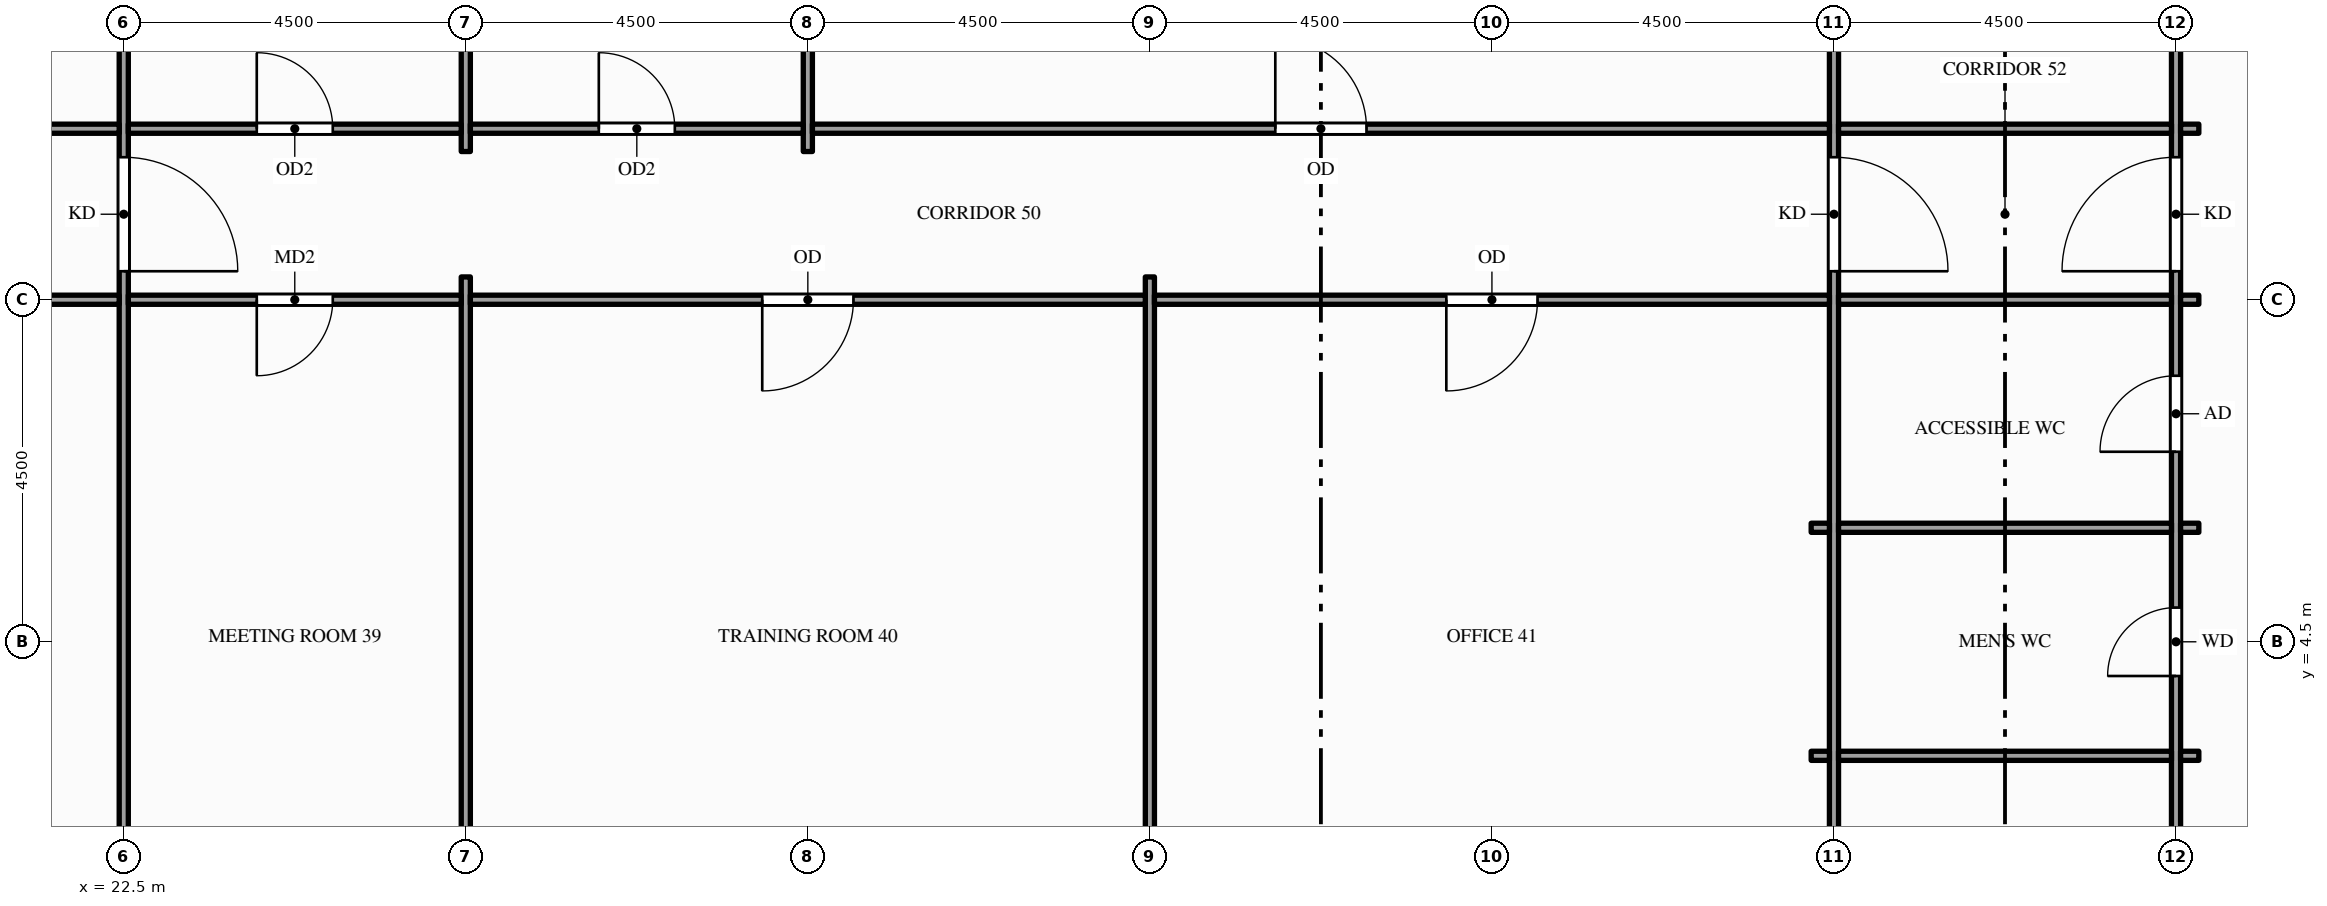
"""IFC4 building model, lengths in metres.
Left out: names, types, materials, properties, quantities, classifications, styles, units other than length and angle.
Written with IfcOpenShell. Run it as: python <this file> out.ifc"""

import sys

from ifc_helpers import new_model, si_unit, direction, frame, frame_2d, origin, place, context, subcontext, project, spatial, rectangle, extrude, element, fill, save


model = new_model("IFC4")
c1 = context("Model", 3, precision=1e-05, world=origin(), true_north=direction((0.0, 1.0)))
c2 = subcontext(c1, "Body", "Model", "MODEL_VIEW")
j1 = project(units=[si_unit("LENGTHUNIT", "METRE"), si_unit("PLANEANGLEUNIT", "RADIAN")], contexts=[c1])
p1 = place(None, origin())
s1 = spatial("IfcSite", under=j1, at=p1, CompositionType="ELEMENT")
p2 = place(p1, origin())
s2 = spatial("IfcBuilding", under=s1, at=p2, CompositionType="ELEMENT")
p3 = place(p2, frame((0.0, 0.0, 14.0)))
s3 = spatial("IfcBuildingStorey", under=s2, at=p3, CompositionType="ELEMENT", Elevation=14.0)
p4 = place(p3, frame((22.5, 0.15, 0.0), z_axis=(0.0, 0.0, 1.0), x_axis=(0.0, 1.0, 0.0)))
e1 = element("IfcWall", 1, at=p4, inside=s3, PredefinedType="PARTITIONING", context=c2, shape_type="SweptSolid", body=[
    extrude(rectangle(XDim=35.95, YDim=0.12, at=frame_2d((17.975, 0.0))), origin(), (0.0, 0.0, 1.0), 3.759),
])
p5 = place(p4, frame((9.225, 0.0, 0.0)))
e2 = element("IfcOpeningElement", 2, at=p5, cuts=e1, PredefinedType="OPENING", context=c2, shape_type="SweptSolid", body=[
    extrude(rectangle(XDim=1.5, YDim=2.1, at=frame_2d((0.75, 1.05))), frame((0.0, 0.07, 0.0), z_axis=(0.0, -1.0, 0.0), x_axis=(1.0, 0.0, 0.0)), (0.0, 0.0, 1.0), 0.14),
])
p6 = place(p4, frame((32.7, 0.0, 0.0)))
e3 = element("IfcOpeningElement", 3, at=p6, cuts=e1, PredefinedType="OPENING", context=c2, shape_type="SweptSolid", body=[
    extrude(rectangle(XDim=1.8, YDim=2.1, at=frame_2d((0.9, 1.05))), frame((0.0, 0.07, 0.0), z_axis=(0.0, -1.0, 0.0), x_axis=(1.0, 0.0, 0.0)), (0.0, 0.0, 1.0), 0.14),
])
p7 = place(p3, frame((27.0, 0.15, 0.0), z_axis=(0.0, 0.0, 1.0), x_axis=(0.0, 1.0, 0.0)))
e4 = element("IfcWall", 4, at=p7, inside=s3, PredefinedType="PARTITIONING", context=c2, shape_type="SweptSolid", body=[
    extrude(rectangle(XDim=9.15, YDim=0.12, at=frame_2d((4.575, 0.0))), origin(), (0.0, 0.0, 1.0), 3.759),
])
for number, where, z_axis, x_axis in (
    (5, (27.0, 10.95, 0.0), (0.0, 0.0, 1.0), (0.0, 1.0, 0.0)),
    (6, (31.5, 10.95, 0.0), (0.0, 0.0, 1.0), (0.0, 1.0, 0.0)),
):
    element("IfcWall", number, at=place(p3, frame(where, z_axis=z_axis, x_axis=x_axis)), inside=s3, PredefinedType="PARTITIONING", context=c2, shape_type="SweptSolid", body=[
        extrude(rectangle(XDim=11.85, YDim=0.12, at=frame_2d((5.925, 0.0))), origin(), (0.0, 0.0, 1.0), 3.759),
    ])
p8 = place(p3, frame((36.0, 0.15, 0.0), z_axis=(0.0, 0.0, 1.0), x_axis=(0.0, 1.0, 0.0)))
e7 = element("IfcWall", 7, at=p8, inside=s3, PredefinedType="PARTITIONING", context=c2, shape_type="SweptSolid", body=[
    extrude(rectangle(XDim=9.15, YDim=0.12, at=frame_2d((4.575, 0.0))), origin(), (0.0, 0.0, 1.0), 3.759),
])
p9 = place(p3, frame((45.0, 0.15, 0.0), z_axis=(0.0, 0.0, 1.0), x_axis=(0.0, 1.0, 0.0)))
e8 = element("IfcWall", 8, at=p9, inside=s3, PredefinedType="PARTITIONING", context=c2, shape_type="SweptSolid", body=[
    extrude(rectangle(XDim=22.65, YDim=0.12, at=frame_2d((11.325, 0.0))), origin(), (0.0, 0.0, 1.0), 3.759),
])
p10 = place(p9, frame((9.225, 0.0, 0.0)))
e9 = element("IfcOpeningElement", 9, at=p10, cuts=e8, PredefinedType="OPENING", context=c2, shape_type="SweptSolid", body=[
    extrude(rectangle(XDim=1.5, YDim=2.1, at=frame_2d((0.75, 1.05))), frame((0.0, 0.07, 0.0), z_axis=(0.0, -1.0, 0.0), x_axis=(1.0, 0.0, 0.0)), (0.0, 0.0, 1.0), 0.14),
])
p11 = place(p3, frame((49.5, 0.15, 0.0), z_axis=(0.0, 0.0, 1.0), x_axis=(0.0, 1.0, 0.0)))
e10 = element("IfcWall", 10, at=p11, inside=s3, PredefinedType="PARTITIONING", context=c2, shape_type="SweptSolid", body=[
    extrude(rectangle(XDim=22.65, YDim=0.12, at=frame_2d((11.325, 0.0))), origin(), (0.0, 0.0, 1.0), 3.759),
])
p12 = place(p11, frame((0.955, 0.0, 0.0)))
e11 = element("IfcOpeningElement", 11, at=p12, cuts=e10, PredefinedType="OPENING", context=c2, shape_type="SweptSolid", body=[
    extrude(rectangle(XDim=0.9, YDim=2.1, at=frame_2d((0.45, 1.05))), frame((0.0, 0.07, 0.0), z_axis=(0.0, -1.0, 0.0), x_axis=(1.0, 0.0, 0.0)), (0.0, 0.0, 1.0), 0.14),
])
p13 = place(p11, frame((3.9, 0.0, 0.0)))
e12 = element("IfcOpeningElement", 12, at=p13, cuts=e10, PredefinedType="OPENING", context=c2, shape_type="SweptSolid", body=[
    extrude(rectangle(XDim=0.9, YDim=2.1, at=frame_2d((0.45, 1.05))), frame((0.0, 0.07, 0.0), z_axis=(0.0, -1.0, 0.0), x_axis=(1.0, 0.0, 0.0)), (0.0, 0.0, 1.0), 0.14),
])
p14 = place(p11, frame((6.85, 0.0, 0.0)))
e13 = element("IfcOpeningElement", 13, at=p14, cuts=e10, PredefinedType="OPENING", context=c2, shape_type="SweptSolid", body=[
    extrude(rectangle(XDim=1.0, YDim=2.1, at=frame_2d((0.5, 1.05))), frame((0.0, 0.07, 0.0), z_axis=(0.0, -1.0, 0.0), x_axis=(1.0, 0.0, 0.0)), (0.0, 0.0, 1.0), 0.14),
])
p15 = place(p11, frame((16.275, 0.0, 0.0)))
e14 = element("IfcOpeningElement", 14, at=p15, cuts=e10, PredefinedType="OPENING", context=c2, shape_type="SweptSolid", body=[
    extrude(rectangle(XDim=0.9, YDim=2.1, at=frame_2d((0.45, 1.05))), frame((0.0, 0.07, 0.0), z_axis=(0.0, -1.0, 0.0), x_axis=(1.0, 0.0, 0.0)), (0.0, 0.0, 1.0), 0.14),
])
p16 = place(p11, frame((9.225, 0.0, 0.0)))
e15 = element("IfcOpeningElement", 15, at=p16, cuts=e10, PredefinedType="OPENING", context=c2, shape_type="SweptSolid", body=[
    extrude(rectangle(XDim=1.5, YDim=2.1, at=frame_2d((0.75, 1.05))), frame((0.0, 0.07, 0.0), z_axis=(0.0, -1.0, 0.0), x_axis=(1.0, 0.0, 0.0)), (0.0, 0.0, 1.0), 0.14),
])
p17 = place(p3, frame((44.7, 3.0, 0.0), z_axis=(0.0, 0.0, 1.0), x_axis=(1.0, 0.0, 0.0)))
e16 = element("IfcWall", 16, at=p17, inside=s3, PredefinedType="PARTITIONING", context=c2, shape_type="SweptSolid", body=[
    extrude(rectangle(XDim=0.24, YDim=0.12, at=frame_2d((0.12, 0.0))), origin(), (0.0, 0.0, 1.0), 3.759),
])
p18 = place(p3, frame((45.06, 3.0, 0.0), z_axis=(0.0, 0.0, 1.0), x_axis=(1.0, 0.0, 0.0)))
e17 = element("IfcWall", 17, at=p18, inside=s3, PredefinedType="PARTITIONING", context=c2, shape_type="SweptSolid", body=[
    extrude(rectangle(XDim=4.38, YDim=0.12, at=frame_2d((2.19, 0.0))), origin(), (0.0, 0.0, 1.0), 3.66),
])
for number, where, z_axis, x_axis in (
    (18, (49.56, 3.0, 0.0), (0.0, 0.0, 1.0), (1.0, 0.0, 0.0)),
    (19, (44.7, 6.0, 0.0), (0.0, 0.0, 1.0), (1.0, 0.0, 0.0)),
):
    element("IfcWall", number, at=place(p3, frame(where, z_axis=z_axis, x_axis=x_axis)), inside=s3, PredefinedType="PARTITIONING", context=c2, shape_type="SweptSolid", body=[
        extrude(rectangle(XDim=0.24, YDim=0.12, at=frame_2d((0.12, 0.0))), origin(), (0.0, 0.0, 1.0), 3.759),
    ])
p19 = place(p3, frame((45.06, 6.0, 0.0), z_axis=(0.0, 0.0, 1.0), x_axis=(1.0, 0.0, 0.0)))
e20 = element("IfcWall", 20, at=p19, inside=s3, PredefinedType="PARTITIONING", context=c2, shape_type="SweptSolid", body=[
    extrude(rectangle(XDim=4.38, YDim=0.12, at=frame_2d((2.19, 0.0))), origin(), (0.0, 0.0, 1.0), 3.66),
])
p20 = place(p3, frame((49.56, 6.0, 0.0), z_axis=(0.0, 0.0, 1.0), x_axis=(1.0, 0.0, 0.0)))
e21 = element("IfcWall", 21, at=p20, inside=s3, PredefinedType="PARTITIONING", context=c2, shape_type="SweptSolid", body=[
    extrude(rectangle(XDim=0.24, YDim=0.12, at=frame_2d((0.12, 0.0))), origin(), (0.0, 0.0, 1.0), 3.759),
])
p21 = place(p3, frame((9.06, 9.0, 0.0), z_axis=(0.0, 0.0, 1.0), x_axis=(1.0, 0.0, 0.0)))
e22 = element("IfcWall", 22, at=p21, inside=s3, PredefinedType="PARTITIONING", context=c2, shape_type="SweptSolid", body=[
    extrude(rectangle(XDim=13.38, YDim=0.12, at=frame_2d((6.69, 0.0))), origin(), (0.0, 0.0, 1.0), 3.759),
])
p22 = place(p21, frame((6.19, 0.0, 0.0)))
e23 = element("IfcOpeningElement", 23, at=p22, cuts=e22, PredefinedType="OPENING", context=c2, shape_type="SweptSolid", body=[
    extrude(rectangle(XDim=1.0, YDim=2.1, at=frame_2d((0.5, 1.05))), frame((0.0, 0.07, 0.0), z_axis=(0.0, -1.0, 0.0), x_axis=(1.0, 0.0, 0.0)), (0.0, 0.0, 1.0), 0.14),
])
p23 = place(p3, frame((22.56, 9.0, 0.0), z_axis=(0.0, 0.0, 1.0), x_axis=(1.0, 0.0, 0.0)))
e24 = element("IfcWall", 24, at=p23, inside=s3, PredefinedType="PARTITIONING", context=c2, shape_type="SweptSolid", body=[
    extrude(rectangle(XDim=4.38, YDim=0.12, at=frame_2d((2.19, 0.0))), origin(), (0.0, 0.0, 1.0), 3.66),
])
p24 = place(p23, frame((1.69, 0.0, 0.0)))
e25 = element("IfcOpeningElement", 25, at=p24, cuts=e24, PredefinedType="OPENING", context=c2, shape_type="SweptSolid", body=[
    extrude(rectangle(XDim=1.0, YDim=2.1, at=frame_2d((0.5, 1.05))), frame((0.0, 0.07, 0.0), z_axis=(0.0, -1.0, 0.0), x_axis=(1.0, 0.0, 0.0)), (0.0, 0.0, 1.0), 0.14),
])
p25 = place(p3, frame((27.06, 9.0, 0.0), z_axis=(0.0, 0.0, 1.0), x_axis=(1.0, 0.0, 0.0)))
e26 = element("IfcWall", 26, at=p25, inside=s3, PredefinedType="PARTITIONING", context=c2, shape_type="SweptSolid", body=[
    extrude(rectangle(XDim=8.88, YDim=0.12, at=frame_2d((4.44, 0.0))), origin(), (0.0, 0.0, 1.0), 3.66),
])
p26 = place(p25, frame((3.84, 0.0, 0.0)))
e27 = element("IfcOpeningElement", 27, at=p26, cuts=e26, PredefinedType="OPENING", context=c2, shape_type="SweptSolid", body=[
    extrude(rectangle(XDim=1.2, YDim=2.1, at=frame_2d((0.6, 1.05))), frame((0.0, 0.07, 0.0), z_axis=(0.0, -1.0, 0.0), x_axis=(1.0, 0.0, 0.0)), (0.0, 0.0, 1.0), 0.14),
])
p27 = place(p3, frame((36.06, 9.0, 0.0), z_axis=(0.0, 0.0, 1.0), x_axis=(1.0, 0.0, 0.0)))
e28 = element("IfcWall", 28, at=p27, inside=s3, PredefinedType="PARTITIONING", context=c2, shape_type="SweptSolid", body=[
    extrude(rectangle(XDim=8.88, YDim=0.12, at=frame_2d((4.44, 0.0))), origin(), (0.0, 0.0, 1.0), 3.66),
])
p28 = place(p27, frame((3.84, 0.0, 0.0)))
e29 = element("IfcOpeningElement", 29, at=p28, cuts=e28, PredefinedType="OPENING", context=c2, shape_type="SweptSolid", body=[
    extrude(rectangle(XDim=1.2, YDim=2.1, at=frame_2d((0.6, 1.05))), frame((0.0, 0.07, 0.0), z_axis=(0.0, -1.0, 0.0), x_axis=(1.0, 0.0, 0.0)), (0.0, 0.0, 1.0), 0.14),
])
p29 = place(p3, frame((45.06, 9.0, 0.0), z_axis=(0.0, 0.0, 1.0), x_axis=(1.0, 0.0, 0.0)))
e30 = element("IfcWall", 30, at=p29, inside=s3, PredefinedType="PARTITIONING", context=c2, shape_type="SweptSolid", body=[
    extrude(rectangle(XDim=4.38, YDim=0.12, at=frame_2d((2.19, 0.0))), origin(), (0.0, 0.0, 1.0), 3.66),
])
p30 = place(p3, frame((49.56, 9.0, 0.0), z_axis=(0.0, 0.0, 1.0), x_axis=(1.0, 0.0, 0.0)))
e31 = element("IfcWall", 31, at=p30, inside=s3, PredefinedType="PARTITIONING", context=c2, shape_type="SweptSolid", body=[
    extrude(rectangle(XDim=0.24, YDim=0.12, at=frame_2d((0.12, 0.0))), origin(), (0.0, 0.0, 1.0), 3.759),
])
p31 = place(p3, frame((11.31, 11.25, 0.0), z_axis=(0.0, 0.0, 1.0), x_axis=(1.0, 0.0, 0.0)))
e32 = element("IfcWall", 32, at=p31, inside=s3, PredefinedType="PARTITIONING", context=c2, shape_type="SweptSolid", body=[
    extrude(rectangle(XDim=11.13, YDim=0.12, at=frame_2d((5.565, 0.0))), origin(), (0.0, 0.0, 1.0), 3.759),
])
p32 = place(p3, frame((22.56, 11.25, 0.0), z_axis=(0.0, 0.0, 1.0), x_axis=(1.0, 0.0, 0.0)))
e33 = element("IfcWall", 33, at=p32, inside=s3, PredefinedType="PARTITIONING", context=c2, shape_type="SweptSolid", body=[
    extrude(rectangle(XDim=4.38, YDim=0.12, at=frame_2d((2.19, 0.0))), origin(), (0.0, 0.0, 1.0), 3.66),
])
p33 = place(p32, frame((1.69, 0.0, 0.0)))
e34 = element("IfcOpeningElement", 34, at=p33, cuts=e33, PredefinedType="OPENING", context=c2, shape_type="SweptSolid", body=[
    extrude(rectangle(XDim=1.0, YDim=2.1, at=frame_2d((0.5, 1.05))), frame((0.0, 0.07, 0.0), z_axis=(0.0, -1.0, 0.0), x_axis=(1.0, 0.0, 0.0)), (0.0, 0.0, 1.0), 0.14),
])
p34 = place(p3, frame((27.06, 11.25, 0.0), z_axis=(0.0, 0.0, 1.0), x_axis=(1.0, 0.0, 0.0)))
e35 = element("IfcWall", 35, at=p34, inside=s3, PredefinedType="PARTITIONING", context=c2, shape_type="SweptSolid", body=[
    extrude(rectangle(XDim=4.38, YDim=0.12, at=frame_2d((2.19, 0.0))), origin(), (0.0, 0.0, 1.0), 3.66),
])
p35 = place(p34, frame((1.69, 0.0, 0.0)))
e36 = element("IfcOpeningElement", 36, at=p35, cuts=e35, PredefinedType="OPENING", context=c2, shape_type="SweptSolid", body=[
    extrude(rectangle(XDim=1.0, YDim=2.1, at=frame_2d((0.5, 1.05))), frame((0.0, 0.07, 0.0), z_axis=(0.0, -1.0, 0.0), x_axis=(1.0, 0.0, 0.0)), (0.0, 0.0, 1.0), 0.14),
])
p36 = place(p3, frame((31.56, 11.25, 0.0), z_axis=(0.0, 0.0, 1.0), x_axis=(1.0, 0.0, 0.0)))
e37 = element("IfcWall", 37, at=p36, inside=s3, PredefinedType="PARTITIONING", context=c2, shape_type="SweptSolid", body=[
    extrude(rectangle(XDim=13.38, YDim=0.12, at=frame_2d((6.69, 0.0))), origin(), (0.0, 0.0, 1.0), 3.66),
])
p37 = place(p36, frame((6.09, 0.0, 0.0)))
e38 = element("IfcOpeningElement", 38, at=p37, cuts=e37, PredefinedType="OPENING", context=c2, shape_type="SweptSolid", body=[
    extrude(rectangle(XDim=1.2, YDim=2.1, at=frame_2d((0.6, 1.05))), frame((0.0, 0.07, 0.0), z_axis=(0.0, -1.0, 0.0), x_axis=(1.0, 0.0, 0.0)), (0.0, 0.0, 1.0), 0.14),
])
p38 = place(p3, frame((45.06, 11.25, 0.0), z_axis=(0.0, 0.0, 1.0), x_axis=(1.0, 0.0, 0.0)))
e39 = element("IfcWall", 39, at=p38, inside=s3, PredefinedType="PARTITIONING", context=c2, shape_type="SweptSolid", body=[
    extrude(rectangle(XDim=4.38, YDim=0.12, at=frame_2d((2.19, 0.0))), origin(), (0.0, 0.0, 1.0), 3.66),
])
p39 = place(p3, frame((49.56, 11.25, 0.0), z_axis=(0.0, 0.0, 1.0), x_axis=(1.0, 0.0, 0.0)))
e40 = element("IfcWall", 40, at=p39, inside=s3, PredefinedType="PARTITIONING", context=c2, shape_type="SweptSolid", body=[
    extrude(rectangle(XDim=0.24, YDim=0.12, at=frame_2d((0.12, 0.0))), origin(), (0.0, 0.0, 1.0), 3.759),
])
p40 = place(p13, origin())
e41 = element("IfcDoor", 41, at=p40, inside=s3, OperationType="SINGLE_SWING_LEFT", PredefinedType="DOOR", context=c2, shape_type="SweptSolid", body=[
    extrude(rectangle(XDim=0.9, YDim=2.1, at=frame_2d((0.45, 1.05))), frame((0.0, 0.025, 0.0), z_axis=(0.0, -1.0, 0.0), x_axis=(1.0, 0.0, 0.0)), (0.0, 0.0, 1.0), 0.05),
])
fill(e12, e41)
p41 = place(p14, origin())
e42 = element("IfcDoor", 42, at=p41, inside=s3, OperationType="SINGLE_SWING_LEFT", PredefinedType="DOOR", context=c2, shape_type="SweptSolid", body=[
    extrude(rectangle(XDim=1.0, YDim=2.1, at=frame_2d((0.5, 1.05))), frame((0.0, 0.025, 0.0), z_axis=(0.0, -1.0, 0.0), x_axis=(1.0, 0.0, 0.0)), (0.0, 0.0, 1.0), 0.05),
])
fill(e13, e42)
p42 = place(p16, origin())
e43 = element("IfcDoor", 43, at=p42, inside=s3, OperationType="SINGLE_SWING_LEFT", PredefinedType="DOOR", context=c2, shape_type="SweptSolid", body=[
    extrude(rectangle(XDim=1.5, YDim=2.1, at=frame_2d((0.75, 1.05))), frame((0.0, 0.025, 0.0), z_axis=(0.0, -1.0, 0.0), x_axis=(1.0, 0.0, 0.0)), (0.0, 0.0, 1.0), 0.05),
])
fill(e15, e43)
p43 = place(p10, origin())
e44 = element("IfcDoor", 44, at=p43, inside=s3, OperationType="SINGLE_SWING_LEFT", PredefinedType="DOOR", context=c2, shape_type="SweptSolid", body=[
    extrude(rectangle(XDim=1.5, YDim=2.1, at=frame_2d((0.75, 1.05))), frame((0.0, 0.025, 0.0), z_axis=(0.0, -1.0, 0.0), x_axis=(1.0, 0.0, 0.0)), (0.0, 0.0, 1.0), 0.05),
])
fill(e9, e44)
p44 = place(p24, origin())
e45 = element("IfcDoor", 45, at=p44, inside=s3, OperationType="SINGLE_SWING_LEFT", PredefinedType="DOOR", context=c2, shape_type="SweptSolid", body=[
    extrude(rectangle(XDim=1.0, YDim=2.1, at=frame_2d((0.5, 1.05))), frame((0.0, 0.025, 0.0), z_axis=(0.0, -1.0, 0.0), x_axis=(1.0, 0.0, 0.0)), (0.0, 0.0, 1.0), 0.05),
])
fill(e25, e45)
p45 = place(p26, origin())
e46 = element("IfcDoor", 46, at=p45, inside=s3, OperationType="SINGLE_SWING_LEFT", PredefinedType="DOOR", context=c2, shape_type="SweptSolid", body=[
    extrude(rectangle(XDim=1.2, YDim=2.1, at=frame_2d((0.6, 1.05))), frame((0.0, 0.025, 0.0), z_axis=(0.0, -1.0, 0.0), x_axis=(1.0, 0.0, 0.0)), (0.0, 0.0, 1.0), 0.05),
])
fill(e27, e46)
p46 = place(p28, origin())
e47 = element("IfcDoor", 47, at=p46, inside=s3, OperationType="SINGLE_SWING_LEFT", PredefinedType="DOOR", context=c2, shape_type="SweptSolid", body=[
    extrude(rectangle(XDim=1.2, YDim=2.1, at=frame_2d((0.6, 1.05))), frame((0.0, 0.025, 0.0), z_axis=(0.0, -1.0, 0.0), x_axis=(1.0, 0.0, 0.0)), (0.0, 0.0, 1.0), 0.05),
])
fill(e29, e47)
p47 = place(p33, origin())
e48 = element("IfcDoor", 48, at=p47, inside=s3, OperationType="SINGLE_SWING_LEFT", PredefinedType="DOOR", context=c2, shape_type="SweptSolid", body=[
    extrude(rectangle(XDim=1.0, YDim=2.1, at=frame_2d((0.5, 1.05))), frame((0.0, 0.025, 0.0), z_axis=(0.0, -1.0, 0.0), x_axis=(1.0, 0.0, 0.0)), (0.0, 0.0, 1.0), 0.05),
])
fill(e34, e48)
p48 = place(p35, origin())
e49 = element("IfcDoor", 49, at=p48, inside=s3, OperationType="SINGLE_SWING_LEFT", PredefinedType="DOOR", context=c2, shape_type="SweptSolid", body=[
    extrude(rectangle(XDim=1.0, YDim=2.1, at=frame_2d((0.5, 1.05))), frame((0.0, 0.025, 0.0), z_axis=(0.0, -1.0, 0.0), x_axis=(1.0, 0.0, 0.0)), (0.0, 0.0, 1.0), 0.05),
])
fill(e36, e49)
p49 = place(p37, origin())
e50 = element("IfcDoor", 50, at=p49, inside=s3, OperationType="SINGLE_SWING_LEFT", PredefinedType="DOOR", context=c2, shape_type="SweptSolid", body=[
    extrude(rectangle(XDim=1.2, YDim=2.1, at=frame_2d((0.6, 1.05))), frame((0.0, 0.025, 0.0), z_axis=(0.0, -1.0, 0.0), x_axis=(1.0, 0.0, 0.0)), (0.0, 0.0, 1.0), 0.05),
])
fill(e38, e50)
p50 = place(p5, origin())
e51 = element("IfcDoor", 51, at=p50, inside=s3, OperationType="SINGLE_SWING_LEFT", PredefinedType="DOOR", context=c2, shape_type="SweptSolid", body=[
    extrude(rectangle(XDim=1.5, YDim=2.1, at=frame_2d((0.75, 1.05))), frame((0.0, 0.025, 0.0), z_axis=(0.0, -1.0, 0.0), x_axis=(1.0, 0.0, 0.0)), (0.0, 0.0, 1.0), 0.05),
])
fill(e2, e51)
save(model, sys.argv[1])
